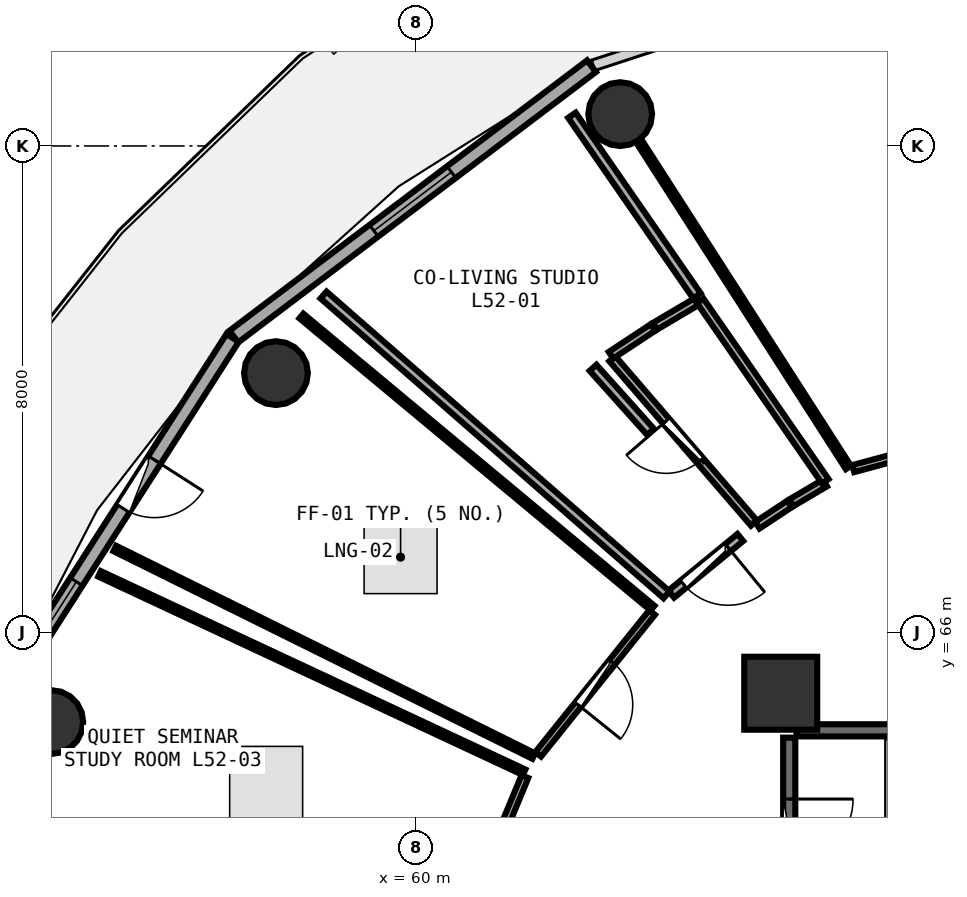
"""IFC4 building model, lengths in metres.
Left out: names, types, materials, properties, quantities, classifications, styles, units other than length and angle.
Written with IfcOpenShell. Run it as: python <this file> out.ifc"""

import sys

from ifc_helpers import new_model, si_unit, direction, frame, frame_2d, origin, origin_2d, place, context, subcontext, project, spatial, rectangle, circle, extrude, element, fill, save


model = new_model("IFC4")
c1 = context("Model", 3, precision=1e-05, world=origin(), true_north=direction((0.0, 1.0)))
c2 = subcontext(c1, "Body", "Model", "MODEL_VIEW")
j1 = project(units=[si_unit("LENGTHUNIT", "METRE"), si_unit("PLANEANGLEUNIT", "RADIAN")], contexts=[c1])
p1 = place(None, origin())
s1 = spatial("IfcSite", under=j1, at=p1, CompositionType="ELEMENT")
p2 = place(p1, origin())
s2 = spatial("IfcBuilding", under=s1, at=p2, CompositionType="ELEMENT")
p3 = place(p2, frame((0.0, 0.0, 204.45)))
s3 = spatial("IfcBuildingStorey", under=s2, at=p3, CompositionType="ELEMENT", Elevation=204.45)
p4 = place(p3, frame((66.0, 65.0, 0.0), z_axis=(0.0, 0.0, 1.0), x_axis=(1.0, 0.0, 0.0)))
e1 = element("IfcColumn", 1, at=p4, inside=s3, PredefinedType="PILASTER", context=c2, shape_type="SweptSolid", body=[
    extrude(rectangle(XDim=1.2, YDim=1.2, at=origin_2d()), origin(), (0.0, 0.0, 1.0), 3.75),
])
for number, where, z_axis, x_axis in (
    (2, (63.36, 74.524, 0.0), (0.0, 0.0, 1.0), (1.0, 0.0, 0.0)),
    (3, (57.698, 70.264, 0.0), (0.0, 0.0, 1.0), (1.0, 0.0, 0.0)),
    (4, (54.003, 64.526, 0.0), (0.0, 0.0, 1.0), (1.0, 0.0, 0.0)),
):
    element("IfcColumn", number, at=place(p3, frame(where, z_axis=z_axis, x_axis=x_axis)), inside=s3, PredefinedType="COLUMN", context=c2, shape_type="SweptSolid", body=[
        extrude(circle(Radius=0.525, at=origin_2d()), origin(), (0.0, 0.0, 1.0), 3.75),
    ])
p5 = place(p3, frame((62.888, 75.312, 0.0), z_axis=(0.0, 0.0, 1.0), x_axis=(-0.797701674595, -0.603052268338, 0.0)))
e5 = element("IfcWall", 5, at=p5, inside=s3, PredefinedType="SOLIDWALL", context=c2, shape_type="SweptSolid", body=[
    extrude(rectangle(XDim=7.374, YDim=0.24, at=frame_2d((3.687, 0.0))), origin(), (0.0, 0.0, 1.0), 3.475),
])
p6 = place(p5, frame((2.887, 0.0, 0.85)))
e6 = element("IfcOpeningElement", 6, at=p6, cuts=e5, PredefinedType="OPENING", context=c2, shape_type="SweptSolid", body=[
    extrude(rectangle(XDim=1.6, YDim=1.45, at=frame_2d((0.8, 0.725))), frame((0.0, 0.13, 0.0), z_axis=(0.0, -1.0, 0.0), x_axis=(1.0, 0.0, 0.0)), (0.0, 0.0, 1.0), 0.26),
])
p7 = place(p3, frame((56.986, 70.843, 0.0), z_axis=(0.0, 0.0, 1.0), x_axis=(-0.539539512973, -0.841960280501, 0.0)))
e7 = element("IfcWall", 7, at=p7, inside=s3, PredefinedType="SOLIDWALL", context=c2, shape_type="SweptSolid", body=[
    extrude(rectangle(XDim=7.115, YDim=0.24, at=frame_2d((3.557, 0.0))), origin(), (0.0, 0.0, 1.0), 3.475),
])
p8 = place(p7, frame((2.382, 0.0, 0.0)))
e8 = element("IfcOpeningElement", 8, at=p8, cuts=e7, PredefinedType="OPENING", context=c2, shape_type="SweptSolid", body=[
    extrude(rectangle(XDim=0.95, YDim=2.1, at=frame_2d((0.475, 1.05))), frame((0.0, 0.13, 0.0), z_axis=(0.0, -1.0, 0.0), x_axis=(1.0, 0.0, 0.0)), (0.0, 0.0, 1.0), 0.26),
])
p9 = place(p7, frame((4.762, 0.0, 0.85)))
e9 = element("IfcOpeningElement", 9, at=p9, cuts=e7, PredefinedType="OPENING", context=c2, shape_type="SweptSolid", body=[
    extrude(rectangle(XDim=1.2, YDim=1.45, at=frame_2d((0.6, 0.725))), frame((0.0, 0.13, 0.0), z_axis=(0.0, -1.0, 0.0), x_axis=(1.0, 0.0, 0.0)), (0.0, 0.0, 1.0), 0.26),
])
p10 = place(p3, frame((73.42, 64.39, 0.0), z_axis=(0.0, 0.0, 1.0), x_axis=(-1.0, 0.0, 0.0)))
e10 = element("IfcWall", 10, at=p10, inside=s3, PredefinedType="SHEAR", context=c2, shape_type="SweptSolid", body=[
    extrude(rectangle(XDim=7.16, YDim=0.2, at=frame_2d((3.58, 0.0))), origin(), (0.0, 0.0, 1.0), 3.49),
])
p11 = place(p3, frame((66.14, 64.27, 0.0), z_axis=(0.0, 0.0, 1.0), x_axis=(0.0, -1.0, 0.0)))
e11 = element("IfcWall", 11, at=p11, inside=s3, PredefinedType="SHEAR", context=c2, shape_type="SweptSolid", body=[
    extrude(rectangle(XDim=3.07, YDim=0.2, at=frame_2d((1.535, 0.0))), origin(), (0.0, 0.0, 1.0), 3.49),
])
p12 = place(p11, frame((1.01, 0.0, 0.0)))
e12 = element("IfcOpeningElement", 12, at=p12, cuts=e11, PredefinedType="OPENING", context=c2, shape_type="SweptSolid", body=[
    extrude(rectangle(XDim=1.05, YDim=2.1, at=frame_2d((0.525, 1.05))), frame((0.0, 0.11, 0.0), z_axis=(0.0, -1.0, 0.0), x_axis=(1.0, 0.0, 0.0)), (0.0, 0.0, 1.0), 0.22),
])
p13 = place(p3, frame((73.104, 70.291, 0.0), z_axis=(0.0, 0.0, 1.0), x_axis=(-0.965361221657, -0.260917059083, 0.0)))
e13 = element("IfcWall", 13, at=p13, inside=s3, PredefinedType="PARTITIONING", context=c2, shape_type="SweptSolid", body=[
    extrude(rectangle(XDim=6.123, YDim=0.12, at=frame_2d((3.062, 0.0))), origin(), (0.0, 0.0, 1.0), 3.025),
])
p14 = place(p13, frame((2.612, 0.0, 0.0)))
e14 = element("IfcOpeningElement", 14, at=p14, cuts=e13, PredefinedType="OPENING", context=c2, shape_type="SweptSolid", body=[
    extrude(rectangle(XDim=0.9, YDim=2.08, at=frame_2d((0.45, 1.04))), frame((0.0, 0.07, 0.0), z_axis=(0.0, -1.0, 0.0), x_axis=(1.0, 0.0, 0.0)), (0.0, 0.0, 1.0), 0.14),
])
p15 = place(p3, frame((65.56, 67.798, 0.0), z_axis=(0.0, 0.0, 1.0), x_axis=(-0.652591857515, 0.757709619515, 0.0)))
e15 = element("IfcWall", 15, at=p15, inside=s3, PredefinedType="PLUMBINGWALL", context=c2, shape_type="SweptSolid", body=[
    extrude(rectangle(XDim=3.57, YDim=0.13, at=frame_2d((1.785, 0.0))), origin(), (0.0, 0.0, 1.0), 3.025),
])
p16 = place(p15, frame((1.355, 0.0, 0.0)))
e16 = element("IfcOpeningElement", 16, at=p16, cuts=e15, PredefinedType="OPENING", context=c2, shape_type="SweptSolid", body=[
    extrude(rectangle(XDim=0.86, YDim=2.05, at=frame_2d((0.43, 1.025))), frame((0.0, 0.075, 0.0), z_axis=(0.0, -1.0, 0.0), x_axis=(1.0, 0.0, 0.0)), (0.0, 0.0, 1.0), 0.15),
])
p17 = place(p3, frame((65.336, 67.561, 0.0), z_axis=(0.0, 0.0, 1.0), x_axis=(-0.773453544763, -0.633852990917, 0.0)))
e17 = element("IfcWall", 17, at=p17, inside=s3, PredefinedType="PARTITIONING", context=c2, shape_type="SweptSolid", body=[
    extrude(rectangle(XDim=1.469, YDim=0.15, at=frame_2d((0.734, 0.0))), origin(), (0.0, 0.0, 1.0), 3.025),
])
p18 = place(p17, frame((0.259, 0.0, 0.0)))
e18 = element("IfcOpeningElement", 18, at=p18, cuts=e17, PredefinedType="OPENING", context=c2, shape_type="SweptSolid", body=[
    extrude(rectangle(XDim=0.95, YDim=2.08, at=frame_2d((0.475, 1.04))), frame((0.0, 0.085, 0.0), z_axis=(0.0, -1.0, 0.0), x_axis=(1.0, 0.0, 0.0)), (0.0, 0.0, 1.0), 0.17),
])
p19 = place(p3, frame((63.885, 66.327, 0.0), z_axis=(0.0, 0.0, 1.0), x_axis=(-0.626276824741, -0.779600756023, 0.0)))
e19 = element("IfcWall", 19, at=p19, inside=s3, PredefinedType="PARTITIONING", context=c2, shape_type="SweptSolid", body=[
    extrude(rectangle(XDim=2.99, YDim=0.12, at=frame_2d((1.495, 0.0))), origin(), (0.0, 0.0, 1.0), 3.025),
])
p20 = place(p19, frame((1.045, 0.0, 0.0)))
e20 = element("IfcOpeningElement", 20, at=p20, cuts=e19, PredefinedType="OPENING", context=c2, shape_type="SweptSolid", body=[
    extrude(rectangle(XDim=0.9, YDim=2.08, at=frame_2d((0.45, 1.04))), frame((0.0, 0.07, 0.0), z_axis=(0.0, -1.0, 0.0), x_axis=(1.0, 0.0, 0.0)), (0.0, 0.0, 1.0), 0.14),
])
p21 = place(p3, frame((61.793, 63.629, 0.0), z_axis=(0.0, 0.0, 1.0), x_axis=(-0.384145151494, -0.923272713007, 0.0)))
e21 = element("IfcWall", 21, at=p21, inside=s3, PredefinedType="PARTITIONING", context=c2, shape_type="SweptSolid", body=[
    extrude(rectangle(XDim=2.913, YDim=0.12, at=frame_2d((1.456, 0.0))), origin(), (0.0, 0.0, 1.0), 3.235),
])
p22 = place(p21, frame((1.006, 0.0, 0.0)))
e22 = element("IfcOpeningElement", 22, at=p22, cuts=e21, PredefinedType="OPENING", context=c2, shape_type="SweptSolid", body=[
    extrude(rectangle(XDim=0.9, YDim=2.08, at=frame_2d((0.45, 1.04))), frame((0.0, 0.07, 0.0), z_axis=(0.0, -1.0, 0.0), x_axis=(1.0, 0.0, 0.0)), (0.0, 0.0, 1.0), 0.14),
])
p23 = place(p3, frame((67.113, 68.712, 0.0), z_axis=(0.0, 0.0, 1.0), x_axis=(-0.540224697902, 0.841520811256, 0.0)))
e23 = element("IfcWall", 23, at=p23, inside=s3, PredefinedType="PARTITIONING", context=c2, shape_type="SweptSolid", body=[
    extrude(rectangle(XDim=6.369, YDim=0.1, at=frame_2d((3.185, 0.0))), origin(), (0.0, 0.0, 1.0), 3.175),
])
p24 = place(p3, frame((66.728, 68.458, 0.0), z_axis=(0.0, 0.0, 1.0), x_axis=(-0.861116863464, -0.508407068655, 0.0)))
e24 = element("IfcWall", 24, at=p24, inside=s3, PredefinedType="PLUMBINGWALL", context=c2, shape_type="SweptSolid", body=[
    extrude(rectangle(XDim=0.638, YDim=0.13, at=frame_2d((0.319, 0.0))), origin(), (0.0, 0.0, 1.0), 3.48),
])
p25 = place(p3, frame((66.144, 68.112, 0.0), z_axis=(0.0, 0.0, 1.0), x_axis=(-0.834414447473, -0.551137487246, 0.0)))
e25 = element("IfcWall", 25, at=p25, inside=s3, PredefinedType="PLUMBINGWALL", context=c2, shape_type="SweptSolid", body=[
    extrude(rectangle(XDim=0.634, YDim=0.13, at=frame_2d((0.317, 0.0))), origin(), (0.0, 0.0, 1.0), 3.48),
])
p26 = place(p3, frame((63.208, 70.559, 0.0), z_axis=(0.0, 0.0, 1.0), x_axis=(0.835081531493, 0.550126199848, 0.0)))
e26 = element("IfcWall", 26, at=p26, inside=s3, PredefinedType="PLUMBINGWALL", context=c2, shape_type="SweptSolid", body=[
    extrude(rectangle(XDim=0.827, YDim=0.13, at=frame_2d((0.413, 0.0))), origin(), (0.0, 0.0, 1.0), 3.48),
])
p27 = place(p3, frame((63.932, 71.035, 0.0), z_axis=(0.0, 0.0, 1.0), x_axis=(0.860534659753, 0.509391891734, 0.0)))
e27 = element("IfcWall", 27, at=p27, inside=s3, PredefinedType="PLUMBINGWALL", context=c2, shape_type="SweptSolid", body=[
    extrude(rectangle(XDim=0.832, YDim=0.13, at=frame_2d((0.416, 0.0))), origin(), (0.0, 0.0, 1.0), 3.025),
])
p28 = place(p3, frame((64.677, 71.453, 0.0), z_axis=(0.0, 0.0, 1.0), x_axis=(0.569617686403, -0.821909782967, 0.0)))
e28 = element("IfcWall", 28, at=p28, inside=s3, PredefinedType="PLUMBINGWALL", context=c2, shape_type="SweptSolid", body=[
    extrude(rectangle(XDim=3.611, YDim=0.13, at=frame_2d((1.806, 0.0))), origin(), (0.0, 0.0, 1.0), 3.175),
])
p29 = place(p3, frame((64.123, 66.618, 0.0), z_axis=(0.0, 0.0, 1.0), x_axis=(-0.752988337425, 0.658033862124, 0.0)))
e29 = element("IfcWall", 29, at=p29, inside=s3, PredefinedType="PARTITIONING", context=c2, shape_type="SweptSolid", body=[
    extrude(rectangle(XDim=7.492, YDim=0.15, at=frame_2d((3.746, 0.0))), origin(), (0.0, 0.0, 1.0), 3.075),
])
p30 = place(p3, frame((62.566, 74.505, 0.0), z_axis=(0.0, 0.0, 1.0), x_axis=(0.569125600833, -0.822250600776, 0.0)))
e30 = element("IfcWall", 30, at=p30, inside=s3, PredefinedType="PARTITIONING", context=c2, shape_type="SweptSolid", body=[
    extrude(rectangle(XDim=3.611, YDim=0.15, at=frame_2d((1.806, 0.0))), origin(), (0.0, 0.0, 1.0), 3.025),
])
p31 = place(p3, frame((62.914, 70.352, 0.0), z_axis=(0.0, 0.0, 1.0), x_axis=(0.667393587085, -0.744705176508, 0.0)))
e31 = element("IfcWall", 31, at=p31, inside=s3, PredefinedType="PARTITIONING", context=c2, shape_type="SweptSolid", body=[
    extrude(rectangle(XDim=1.418, YDim=0.15, at=frame_2d((0.709, 0.0))), origin(), (0.0, 0.0, 1.0), 3.175),
])
p32 = place(p3, frame((61.938, 63.967, 0.0), z_axis=(0.0, 0.0, 1.0), x_axis=(-0.896052906747, 0.443947281003, 0.0)))
e32 = element("IfcWall", 32, at=p32, inside=s3, PredefinedType="PARTITIONING", context=c2, shape_type="SweptSolid", body=[
    extrude(rectangle(XDim=7.691, YDim=0.1, at=frame_2d((3.845, 0.0))), origin(), (0.0, 0.0, 1.0), 3.025),
])
p33 = place(p3, frame((58.117, 71.203, 0.0), z_axis=(0.0, 0.0, 1.0), x_axis=(0.768764498043, -0.63953197461, 0.0)))
e33 = element("IfcWall", 33, at=p33, inside=s3, PredefinedType="PARTITIONING", context=c2, shape_type="SweptSolid", body=[
    extrude(rectangle(XDim=7.511, YDim=0.1, at=frame_2d((3.756, 0.0))), origin(), (0.0, 0.0, 1.0), 3.025),
])
p34 = place(p3, frame((54.797, 66.963, 0.0), z_axis=(0.0, 0.0, 1.0), x_axis=(0.906002589331, -0.423272144283, 0.0)))
e34 = element("IfcWall", 34, at=p34, inside=s3, PredefinedType="PARTITIONING", context=c2, shape_type="SweptSolid", body=[
    extrude(rectangle(XDim=7.707, YDim=0.1, at=frame_2d((3.854, 0.0))), origin(), (0.0, 0.0, 1.0), 3.025),
])
p35 = place(p6, origin())
e35 = element("IfcWindow", 35, at=p35, inside=s3, PartitioningType="SINGLE_PANEL", PredefinedType="WINDOW", context=c2, shape_type="SweptSolid", body=[
    extrude(rectangle(XDim=1.6, YDim=1.45, at=frame_2d((0.8, 0.725))), frame((0.0, 0.03, 0.0), z_axis=(0.0, -1.0, 0.0), x_axis=(1.0, 0.0, 0.0)), (0.0, 0.0, 1.0), 0.06),
])
fill(e6, e35)
p36 = place(p8, frame((0.95, 0.0, 0.0), z_axis=(0.0, 0.0, 1.0), x_axis=(-1.0, 0.0, 0.0)))
e36 = element("IfcDoor", 36, at=p36, inside=s3, OperationType="SINGLE_SWING_RIGHT", PredefinedType="DOOR", context=c2, shape_type="SweptSolid", body=[
    extrude(rectangle(XDim=0.95, YDim=2.1, at=frame_2d((0.475, 1.05))), frame((0.0, 0.025, 0.0), z_axis=(0.0, -1.0, 0.0), x_axis=(1.0, 0.0, 0.0)), (0.0, 0.0, 1.0), 0.05),
])
fill(e8, e36)
p37 = place(p9, origin())
e37 = element("IfcWindow", 37, at=p37, inside=s3, PartitioningType="SINGLE_PANEL", PredefinedType="WINDOW", context=c2, shape_type="SweptSolid", body=[
    extrude(rectangle(XDim=1.2, YDim=1.45, at=frame_2d((0.6, 0.725))), frame((0.0, 0.03, 0.0), z_axis=(0.0, -1.0, 0.0), x_axis=(1.0, 0.0, 0.0)), (0.0, 0.0, 1.0), 0.06),
])
fill(e9, e37)
p38 = place(p12, origin())
e38 = element("IfcDoor", 38, at=p38, inside=s3, OperationType="SINGLE_SWING_LEFT", PredefinedType="DOOR", context=c2, shape_type="SweptSolid", body=[
    extrude(rectangle(XDim=1.05, YDim=2.1, at=frame_2d((0.525, 1.05))), frame((0.0, 0.025, 0.0), z_axis=(0.0, -1.0, 0.0), x_axis=(1.0, 0.0, 0.0)), (0.0, 0.0, 1.0), 0.05),
])
fill(e12, e38)
p39 = place(p16, origin())
e39 = element("IfcDoor", 39, at=p39, inside=s3, OperationType="SINGLE_SWING_RIGHT", PredefinedType="DOOR", context=c2, shape_type="SweptSolid", body=[
    extrude(rectangle(XDim=0.86, YDim=2.05, at=frame_2d((0.43, 1.025))), frame((0.0, 0.025, 0.0), z_axis=(0.0, -1.0, 0.0), x_axis=(1.0, 0.0, 0.0)), (0.0, 0.0, 1.0), 0.05),
])
fill(e16, e39)
p40 = place(p18, origin())
e40 = element("IfcDoor", 40, at=p40, inside=s3, OperationType="SINGLE_SWING_LEFT", PredefinedType="DOOR", context=c2, shape_type="SweptSolid", body=[
    extrude(rectangle(XDim=0.95, YDim=2.08, at=frame_2d((0.475, 1.04))), frame((0.0, 0.025, 0.0), z_axis=(0.0, -1.0, 0.0), x_axis=(1.0, 0.0, 0.0)), (0.0, 0.0, 1.0), 0.05),
])
fill(e18, e40)
p41 = place(p20, origin())
e41 = element("IfcDoor", 41, at=p41, inside=s3, OperationType="SINGLE_SWING_RIGHT", PredefinedType="DOOR", context=c2, shape_type="SweptSolid", body=[
    extrude(rectangle(XDim=0.9, YDim=2.08, at=frame_2d((0.45, 1.04))), frame((0.0, 0.025, 0.0), z_axis=(0.0, -1.0, 0.0), x_axis=(1.0, 0.0, 0.0)), (0.0, 0.0, 1.0), 0.05),
])
fill(e20, e41)
save(model, sys.argv[1])
